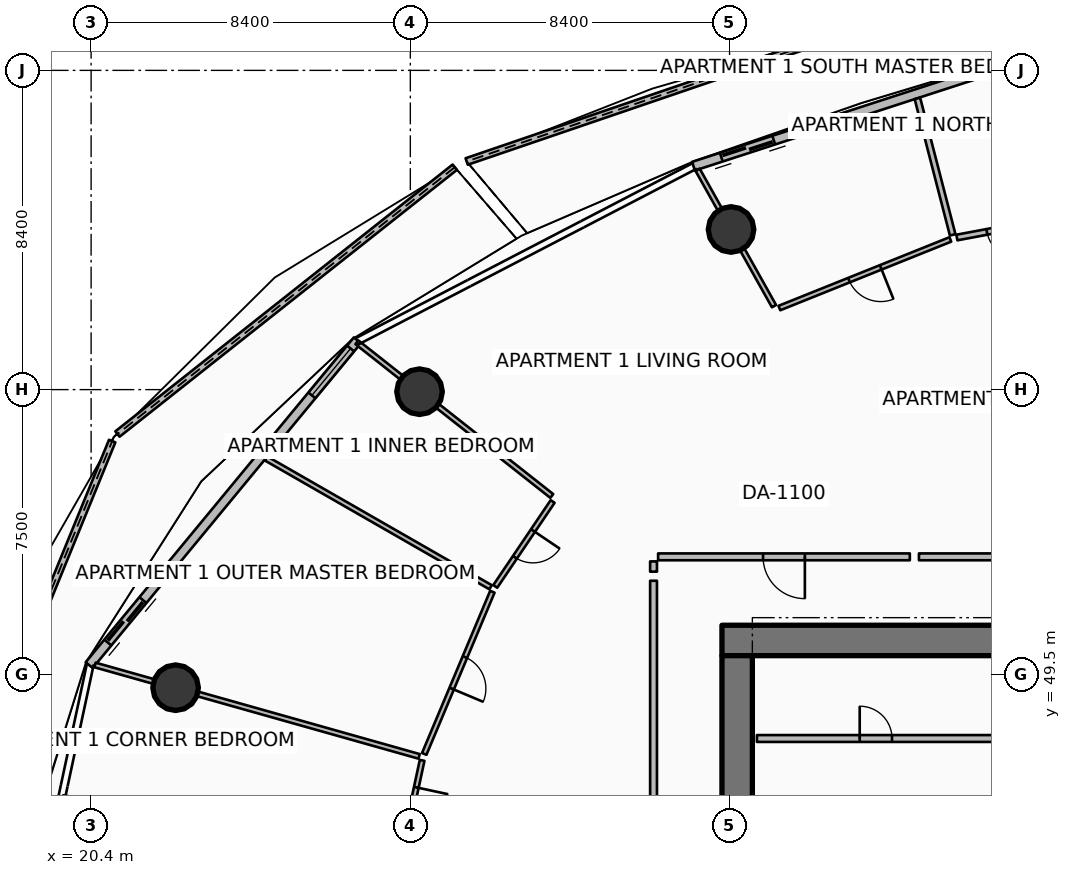
"""IFC4 building model, lengths in metres.
Left out: names, types, materials, properties, quantities, classifications, styles, units other than length and angle.
Written with IfcOpenShell. Run it as: python <this file> out.ifc"""

import sys

from ifc_helpers import new_model, si_unit, direction, frame, frame_2d, origin, origin_2d, place, context, subcontext, project, spatial, polyline, rectangle, circle, outline, extrude, element, fill, save


model = new_model("IFC4")
c1 = context("Model", 3, precision=1e-05, world=origin(), true_north=direction((0.0, 1.0)))
c2 = subcontext(c1, "Body", "Model", "MODEL_VIEW")
j1 = project(units=[si_unit("LENGTHUNIT", "METRE"), si_unit("PLANEANGLEUNIT", "RADIAN")], contexts=[c1])
p1 = place(None, origin())
s1 = spatial("IfcSite", under=j1, at=p1, CompositionType="ELEMENT")
p2 = place(p1, origin())
s2 = spatial("IfcBuilding", under=s1, at=p2, CompositionType="ELEMENT")
p3 = place(p2, frame((0.0, 0.0, 108.9)))
s3 = spatial("IfcBuildingStorey", under=s2, at=p3, CompositionType="ELEMENT", Elevation=108.9)
p4 = place(p3, frame((37.0, 50.4, 0.0), z_axis=(0.0, 0.0, 1.0), x_axis=(1.0, 0.0, 0.0)))
e1 = element("IfcWall", 1, at=p4, inside=s3, PredefinedType="SHEAR", context=c2, shape_type="SweptSolid", body=[
    extrude(rectangle(XDim=9.9, YDim=0.8, at=frame_2d((4.95, 0.0))), origin(), (0.0, 0.0, 1.0), 3.75),
])
p5 = place(p3, frame((37.4, 34.0, 0.0), z_axis=(0.0, 0.0, 1.0), x_axis=(0.0, 1.0, 0.0)))
e2 = element("IfcWall", 2, at=p5, inside=s3, PredefinedType="SHEAR", context=c2, shape_type="SweptSolid", body=[
    extrude(rectangle(XDim=16.0, YDim=0.8, at=frame_2d((8.0, 0.0))), origin(), (0.0, 0.0, 1.0), 3.75),
])
for number, where, z_axis, x_axis in (
    (3, (37.24, 61.214, 0.0), (0.0, 0.0, 1.0), (1.0, 0.0, 0.0)),
    (4, (29.042, 56.945, 0.0), (0.0, 0.0, 1.0), (1.0, 0.0, 0.0)),
    (5, (22.623, 49.157, 0.0), (0.0, 0.0, 1.0), (1.0, 0.0, 0.0)),
):
    element("IfcColumn", number, at=place(p3, frame(where, z_axis=z_axis, x_axis=x_axis)), inside=s3, PredefinedType="COLUMN", context=c2, shape_type="SweptSolid", body=[
        extrude(circle(Radius=0.6, at=origin_2d()), origin(), (0.0, 0.0, 1.0), 3.5),
    ])
p6 = place(p3, frame((39.975, 66.311, 0.0), z_axis=(0.0, 0.0, 1.0), x_axis=(-0.94637474678, -0.323070949881, 0.0)))
e6 = element("IfcWall", 6, at=p6, inside=s3, PredefinedType="PARAPET", context=c2, shape_type="SweptSolid", body=[
    extrude(outline(polyline([(0.0, 0.0), (10.241, 0.0), (10.241, 1.747), (5.121, 1.562), (0.0, 1.348), (0.0, 0.0)])), frame((0.0, 0.09, 0.0), z_axis=(0.0, -1.0, 0.0), x_axis=(1.0, 0.0, 0.0)), (0.0, 0.0, 1.0), 0.18),
])
p7 = place(p3, frame((29.969, 62.852, 0.0), z_axis=(0.0, 0.0, 1.0), x_axis=(-0.784321358075, -0.620354743084, 0.0)))
e7 = element("IfcWall", 7, at=p7, inside=s3, PredefinedType="PARAPET", context=c2, shape_type="SweptSolid", body=[
    extrude(outline(polyline([(0.0, 0.0), (11.316, 0.0), (11.316, 1.832), (5.658, 1.853), (0.0, 1.756), (0.0, 0.0)])), frame((0.0, 0.09, 0.0), z_axis=(0.0, -1.0, 0.0), x_axis=(1.0, 0.0, 0.0)), (0.0, 0.0, 1.0), 0.18),
])
p8 = place(p3, frame((20.954, 55.646, 0.0), z_axis=(0.0, 0.0, 1.0), x_axis=(-0.378274271274, -0.925693564681, 0.0)))
e8 = element("IfcWall", 8, at=p8, inside=s3, PredefinedType="PARAPET", context=c2, shape_type="SweptSolid", body=[
    extrude(outline(polyline([(0.0, 0.0), (11.852, 0.0), (11.852, 1.497), (5.926, 1.696), (0.0, 1.832), (0.0, 0.0)])), frame((0.0, 0.09, 0.0), z_axis=(0.0, -1.0, 0.0), x_axis=(1.0, 0.0, 0.0)), (0.0, 0.0, 1.0), 0.18),
])
p9 = place(p3, frame((45.233, 65.797, 0.0), z_axis=(0.0, 0.0, 1.0), x_axis=(-0.951052494852, -0.30902937083, 0.0)))
e9 = element("IfcWall", 9, at=p9, inside=s3, PredefinedType="SOLIDWALL", context=c2, shape_type="SweptSolid", body=[
    extrude(rectangle(XDim=9.444, YDim=0.24, at=frame_2d((4.722, 0.0))), origin(), (0.0, 0.0, 1.0), 2.45),
])
p10 = place(p9, frame((7.224, 0.0, 0.0)))
e10 = element("IfcOpeningElement", 10, at=p10, cuts=e9, PredefinedType="OPENING", context=c2, shape_type="SweptSolid", body=[
    extrude(rectangle(XDim=1.45, YDim=2.15, at=frame_2d((0.725, 1.075))), frame((0.0, 0.13, 0.0), z_axis=(0.0, -1.0, 0.0), x_axis=(1.0, 0.0, 0.0)), (0.0, 0.0, 1.0), 0.26),
])
p11 = place(p9, frame((0.28, 0.0, 0.65)))
e11 = element("IfcOpeningElement", 11, at=p11, cuts=e9, PredefinedType="OPENING", context=c2, shape_type="SweptSolid", body=[
    extrude(rectangle(XDim=1.6, YDim=1.5, at=frame_2d((0.8, 0.75))), frame((0.0, 0.13, 0.0), z_axis=(0.0, -1.0, 0.0), x_axis=(1.0, 0.0, 0.0)), (0.0, 0.0, 1.0), 0.26),
])
p12 = place(p3, frame((27.407, 58.298, 0.0), z_axis=(0.0, 0.0, 1.0), x_axis=(-0.636704975, -0.771107498868, 0.0)))
e12 = element("IfcWall", 12, at=p12, inside=s3, PredefinedType="SOLIDWALL", context=c2, shape_type="SweptSolid", body=[
    extrude(rectangle(XDim=11.084, YDim=0.24, at=frame_2d((5.542, 0.0))), origin(), (0.0, 0.0, 1.0), 2.45),
])
p13 = place(p12, frame((8.864, 0.0, 0.0)))
e13 = element("IfcOpeningElement", 13, at=p13, cuts=e12, PredefinedType="OPENING", context=c2, shape_type="SweptSolid", body=[
    extrude(rectangle(XDim=1.45, YDim=2.15, at=frame_2d((0.725, 1.075))), frame((0.0, 0.13, 0.0), z_axis=(0.0, -1.0, 0.0), x_axis=(1.0, 0.0, 0.0)), (0.0, 0.0, 1.0), 0.26),
])
p14 = place(p12, frame((0.28, 0.0, 0.65)))
e14 = element("IfcOpeningElement", 14, at=p14, cuts=e12, PredefinedType="OPENING", context=c2, shape_type="SweptSolid", body=[
    extrude(rectangle(XDim=1.6, YDim=1.5, at=frame_2d((0.8, 0.75))), frame((0.0, 0.13, 0.0), z_axis=(0.0, -1.0, 0.0), x_axis=(1.0, 0.0, 0.0)), (0.0, 0.0, 1.0), 0.26),
])
p15 = place(p3, frame((37.92, 47.82, 0.0), z_axis=(0.0, 0.0, 1.0), x_axis=(1.0, 0.0, 0.0)))
e15 = element("IfcWall", 15, at=p15, inside=s3, PredefinedType="PARTITIONING", context=c2, shape_type="SweptSolid", body=[
    extrude(rectangle(XDim=6.26, YDim=0.18, at=frame_2d((3.13, 0.0))), origin(), (0.0, 0.0, 1.0), 3.5),
])
p16 = place(p15, frame((2.705, 0.0, 0.0)))
e16 = element("IfcOpeningElement", 16, at=p16, cuts=e15, PredefinedType="OPENING", context=c2, shape_type="SweptSolid", body=[
    extrude(rectangle(XDim=0.85, YDim=2.06, at=frame_2d((0.425, 1.03))), frame((0.0, 0.1, 0.0), z_axis=(0.0, -1.0, 0.0), x_axis=(1.0, 0.0, 0.0)), (0.0, 0.0, 1.0), 0.2),
])
p17 = place(p3, frame((41.944, 52.6, 0.0), z_axis=(0.0, 0.0, 1.0), x_axis=(-1.0, 0.0, 0.0)))
e17 = element("IfcWall", 17, at=p17, inside=s3, PredefinedType="PARTITIONING", context=c2, shape_type="SweptSolid", body=[
    extrude(rectangle(XDim=6.624, YDim=0.18, at=frame_2d((3.312, 0.0))), origin(), (0.0, 0.0, 1.0), 2.94),
])
p18 = place(p17, frame((2.762, 0.0, 0.0)))
e18 = element("IfcOpeningElement", 18, at=p18, cuts=e17, PredefinedType="OPENING", context=c2, shape_type="SweptSolid", body=[
    extrude(rectangle(XDim=1.1, YDim=2.1, at=frame_2d((0.55, 1.05))), frame((0.0, 0.1, 0.0), z_axis=(0.0, -1.0, 0.0), x_axis=(1.0, 0.0, 0.0)), (0.0, 0.0, 1.0), 0.2),
])
p19 = place(p3, frame((35.2, 52.48, 0.0), z_axis=(0.0, 0.0, 1.0), x_axis=(0.0, -1.0, 0.0)))
e19 = element("IfcWall", 19, at=p19, inside=s3, PredefinedType="PARTITIONING", context=c2, shape_type="SweptSolid", body=[
    extrude(rectangle(XDim=0.269, YDim=0.18, at=frame_2d((0.135, 0.0))), origin(), (0.0, 0.0, 1.0), 2.94),
])
p20 = place(p3, frame((46.625, 52.6, 0.0), z_axis=(0.0, 0.0, 1.0), x_axis=(-1.0, 0.0, 0.0)))
e20 = element("IfcWall", 20, at=p20, inside=s3, PredefinedType="PARTITIONING", context=c2, shape_type="SweptSolid", body=[
    extrude(rectangle(XDim=4.442, YDim=0.18, at=frame_2d((2.221, 0.0))), origin(), (0.0, 0.0, 1.0), 2.94),
])
p21 = place(p3, frame((38.37, 59.196, 0.0), z_axis=(0.0, 0.0, 1.0), x_axis=(-0.488603368932, 0.87250601595, 0.0)))
e21 = element("IfcWall", 21, at=p21, inside=s3, PredefinedType="PARTITIONING", context=c2, shape_type="SweptSolid", body=[
    extrude(rectangle(XDim=4.113, YDim=0.125, at=frame_2d((2.057, 0.0))), origin(), (0.0, 0.0, 1.0), 2.94),
])
p22 = place(p3, frame((45.597, 61.455, 0.0), z_axis=(0.0, 0.0, 1.0), x_axis=(-0.982882310082, -0.18423453674, 0.0)))
e22 = element("IfcWall", 22, at=p22, inside=s3, PredefinedType="PARTITIONING", context=c2, shape_type="SweptSolid", body=[
    extrude(rectangle(XDim=2.457, YDim=0.15, at=frame_2d((1.229, 0.0))), origin(), (0.0, 0.0, 1.0), 2.94),
])
p23 = place(p22, frame((0.803, 0.0, 0.0)))
e23 = element("IfcOpeningElement", 23, at=p23, cuts=e22, PredefinedType="OPENING", context=c2, shape_type="SweptSolid", body=[
    extrude(rectangle(XDim=0.85, YDim=2.06, at=frame_2d((0.425, 1.03))), frame((0.0, 0.085, 0.0), z_axis=(0.0, -1.0, 0.0), x_axis=(1.0, 0.0, 0.0)), (0.0, 0.0, 1.0), 0.17),
])
p24 = place(p3, frame((43.071, 61.073, 0.0), z_axis=(0.0, 0.0, 1.0), x_axis=(-0.250228515302, 0.968186805389, 0.0)))
e24 = element("IfcWall", 24, at=p24, inside=s3, PredefinedType="PARTITIONING", context=c2, shape_type="SweptSolid", body=[
    extrude(rectangle(XDim=3.708, YDim=0.15, at=frame_2d((1.854, 0.0))), origin(), (0.0, 0.0, 1.0), 2.94),
])
p25 = place(p3, frame((43.01, 60.952, 0.0), z_axis=(0.0, 0.0, 1.0), x_axis=(-0.9280140097, -0.372545296307, 0.0)))
e25 = element("IfcWall", 25, at=p25, inside=s3, PredefinedType="PARTITIONING", context=c2, shape_type="SweptSolid", body=[
    extrude(rectangle(XDim=4.847, YDim=0.125, at=frame_2d((2.424, 0.0))), origin(), (0.0, 0.0, 1.0), 2.94),
])
p26 = place(p25, frame((1.974, 0.0, 0.0)))
e26 = element("IfcOpeningElement", 26, at=p26, cuts=e25, PredefinedType="OPENING", context=c2, shape_type="SweptSolid", body=[
    extrude(rectangle(XDim=0.9, YDim=2.08, at=frame_2d((0.45, 1.04))), frame((0.0, 0.073, 0.0), z_axis=(0.0, -1.0, 0.0), x_axis=(1.0, 0.0, 0.0)), (0.0, 0.0, 1.0), 0.145),
])
p27 = place(p3, frame((35.2, 51.971, 0.0), z_axis=(0.0, 0.0, 1.0), x_axis=(0.0, -1.0, 0.0)))
e27 = element("IfcWall", 27, at=p27, inside=s3, PredefinedType="PARTITIONING", context=c2, shape_type="SweptSolid", body=[
    extrude(rectangle(XDim=6.241, YDim=0.18, at=frame_2d((3.12, 0.0))), origin(), (0.0, 0.0, 1.0), 2.94),
])
p28 = place(p3, frame((32.522, 54.202, 0.0), z_axis=(0.0, 0.0, 1.0), x_axis=(-0.785296086335, 0.619120389574, 0.0)))
e28 = element("IfcWall", 28, at=p28, inside=s3, PredefinedType="PARTITIONING", context=c2, shape_type="SweptSolid", body=[
    extrude(rectangle(XDim=6.529, YDim=0.125, at=frame_2d((3.265, 0.0))), origin(), (0.0, 0.0, 1.0), 2.94),
])
p29 = place(p3, frame((30.912, 51.8, 0.0), z_axis=(0.0, 0.0, 1.0), x_axis=(-0.867452705788, 0.497519651091, 0.0)))
e29 = element("IfcWall", 29, at=p29, inside=s3, PredefinedType="PARTITIONING", context=c2, shape_type="SweptSolid", body=[
    extrude(rectangle(XDim=6.814, YDim=0.125, at=frame_2d((3.407, 0.0))), origin(), (0.0, 0.0, 1.0), 2.94),
])
p30 = place(p3, frame((32.545, 54.057, 0.0), z_axis=(0.0, 0.0, 1.0), x_axis=(-0.559849013212, -0.828594642998, 0.0)))
e30 = element("IfcWall", 30, at=p30, inside=s3, PredefinedType="PARTITIONING", context=c2, shape_type="SweptSolid", body=[
    extrude(rectangle(XDim=2.697, YDim=0.125, at=frame_2d((1.349, 0.0))), origin(), (0.0, 0.0, 1.0), 2.94),
])
p31 = place(p30, frame((0.924, 0.0, 0.0)))
e31 = element("IfcOpeningElement", 31, at=p31, cuts=e30, PredefinedType="OPENING", context=c2, shape_type="SweptSolid", body=[
    extrude(rectangle(XDim=0.85, YDim=2.06, at=frame_2d((0.425, 1.03))), frame((0.0, 0.073, 0.0), z_axis=(0.0, -1.0, 0.0), x_axis=(1.0, 0.0, 0.0)), (0.0, 0.0, 1.0), 0.145),
])
p32 = place(p3, frame((30.959, 51.682, 0.0), z_axis=(0.0, 0.0, 1.0), x_axis=(-0.387377754923, -0.921921078505, 0.0)))
e32 = element("IfcWall", 32, at=p32, inside=s3, PredefinedType="PARTITIONING", context=c2, shape_type="SweptSolid", body=[
    extrude(rectangle(XDim=4.628, YDim=0.125, at=frame_2d((2.314, 0.0))), origin(), (0.0, 0.0, 1.0), 2.94),
])
p33 = place(p32, frame((1.864, 0.0, 0.0)))
e33 = element("IfcOpeningElement", 33, at=p33, cuts=e32, PredefinedType="OPENING", context=c2, shape_type="SweptSolid", body=[
    extrude(rectangle(XDim=0.9, YDim=2.08, at=frame_2d((0.45, 1.04))), frame((0.0, 0.073, 0.0), z_axis=(0.0, -1.0, 0.0), x_axis=(1.0, 0.0, 0.0)), (0.0, 0.0, 1.0), 0.145),
])
p34 = place(p3, frame((29.031, 47.35, 0.0), z_axis=(0.0, 0.0, 1.0), x_axis=(-0.962455027906, 0.271441189317, 0.0)))
e34 = element("IfcWall", 34, at=p34, inside=s3, PredefinedType="PARTITIONING", context=c2, shape_type="SweptSolid", body=[
    extrude(rectangle(XDim=8.862, YDim=0.125, at=frame_2d((4.431, 0.0))), origin(), (0.0, 0.0, 1.0), 2.94),
])
p35 = place(p3, frame((28.52, 44.929, 0.0), z_axis=(0.0, 0.0, 1.0), x_axis=(-0.988886383278, 0.148673201912, 0.0)))
e35 = element("IfcWall", 35, at=p35, inside=s3, PredefinedType="PARTITIONING", context=c2, shape_type="SweptSolid", body=[
    extrude(rectangle(XDim=8.969, YDim=0.125, at=frame_2d((4.485, 0.0))), origin(), (0.0, 0.0, 1.0), 2.94),
])
p36 = place(p3, frame((29.11, 47.244, 0.0), z_axis=(0.0, 0.0, 1.0), x_axis=(-0.210470334655, -0.977600244594, 0.0)))
e36 = element("IfcWall", 36, at=p36, inside=s3, PredefinedType="PARTITIONING", context=c2, shape_type="SweptSolid", body=[
    extrude(rectangle(XDim=2.302, YDim=0.125, at=frame_2d((1.151, 0.0))), origin(), (0.0, 0.0, 1.0), 2.94),
])
p37 = place(p36, frame((0.726, 0.0, 0.0)))
e37 = element("IfcOpeningElement", 37, at=p37, cuts=e36, PredefinedType="OPENING", context=c2, shape_type="SweptSolid", body=[
    extrude(rectangle(XDim=0.85, YDim=2.06, at=frame_2d((0.425, 1.03))), frame((0.0, 0.073, 0.0), z_axis=(0.0, -1.0, 0.0), x_axis=(1.0, 0.0, 0.0)), (0.0, 0.0, 1.0), 0.145),
])
p38 = place(p10, origin())
e38 = element("IfcDoor", 38, at=p38, inside=s3, OperationType="DOUBLE_DOOR_SLIDING", PredefinedType="DOOR", context=c2, shape_type="SweptSolid", body=[
    extrude(rectangle(XDim=1.45, YDim=2.15, at=frame_2d((0.725, 1.075))), frame((0.0, 0.025, 0.0), z_axis=(0.0, -1.0, 0.0), x_axis=(1.0, 0.0, 0.0)), (0.0, 0.0, 1.0), 0.05),
])
fill(e10, e38)
p39 = place(p11, origin())
e39 = element("IfcWindow", 39, at=p39, inside=s3, PartitioningType="SINGLE_PANEL", PredefinedType="WINDOW", context=c2, shape_type="SweptSolid", body=[
    extrude(rectangle(XDim=1.6, YDim=1.5, at=frame_2d((0.8, 0.75))), frame((0.0, 0.03, 0.0), z_axis=(0.0, -1.0, 0.0), x_axis=(1.0, 0.0, 0.0)), (0.0, 0.0, 1.0), 0.06),
])
fill(e11, e39)
p40 = place(p13, origin())
e40 = element("IfcDoor", 40, at=p40, inside=s3, OperationType="DOUBLE_DOOR_SLIDING", PredefinedType="DOOR", context=c2, shape_type="SweptSolid", body=[
    extrude(rectangle(XDim=1.45, YDim=2.15, at=frame_2d((0.725, 1.075))), frame((0.0, 0.025, 0.0), z_axis=(0.0, -1.0, 0.0), x_axis=(1.0, 0.0, 0.0)), (0.0, 0.0, 1.0), 0.05),
])
fill(e13, e40)
p41 = place(p14, origin())
e41 = element("IfcWindow", 41, at=p41, inside=s3, PartitioningType="SINGLE_PANEL", PredefinedType="WINDOW", context=c2, shape_type="SweptSolid", body=[
    extrude(rectangle(XDim=1.6, YDim=1.5, at=frame_2d((0.8, 0.75))), frame((0.0, 0.03, 0.0), z_axis=(0.0, -1.0, 0.0), x_axis=(1.0, 0.0, 0.0)), (0.0, 0.0, 1.0), 0.06),
])
fill(e14, e41)
p42 = place(p16, origin())
e42 = element("IfcDoor", 42, at=p42, inside=s3, OperationType="SINGLE_SWING_LEFT", PredefinedType="DOOR", context=c2, shape_type="SweptSolid", body=[
    extrude(rectangle(XDim=0.85, YDim=2.06, at=frame_2d((0.425, 1.03))), frame((0.0, 0.025, 0.0), z_axis=(0.0, -1.0, 0.0), x_axis=(1.0, 0.0, 0.0)), (0.0, 0.0, 1.0), 0.05),
])
fill(e16, e42)
p43 = place(p18, origin())
e43 = element("IfcDoor", 43, at=p43, inside=s3, OperationType="SINGLE_SWING_LEFT", PredefinedType="DOOR", context=c2, shape_type="SweptSolid", body=[
    extrude(rectangle(XDim=1.1, YDim=2.1, at=frame_2d((0.55, 1.05))), frame((0.0, 0.025, 0.0), z_axis=(0.0, -1.0, 0.0), x_axis=(1.0, 0.0, 0.0)), (0.0, 0.0, 1.0), 0.05),
])
fill(e18, e43)
p44 = place(p23, origin())
e44 = element("IfcDoor", 44, at=p44, inside=s3, OperationType="SINGLE_SWING_LEFT", PredefinedType="DOOR", context=c2, shape_type="SweptSolid", body=[
    extrude(rectangle(XDim=0.85, YDim=2.06, at=frame_2d((0.425, 1.03))), frame((0.0, 0.025, 0.0), z_axis=(0.0, -1.0, 0.0), x_axis=(1.0, 0.0, 0.0)), (0.0, 0.0, 1.0), 0.05),
])
fill(e23, e44)
p45 = place(p26, origin())
e45 = element("IfcDoor", 45, at=p45, inside=s3, OperationType="SINGLE_SWING_LEFT", PredefinedType="DOOR", context=c2, shape_type="SweptSolid", body=[
    extrude(rectangle(XDim=0.9, YDim=2.08, at=frame_2d((0.45, 1.04))), frame((0.0, 0.025, 0.0), z_axis=(0.0, -1.0, 0.0), x_axis=(1.0, 0.0, 0.0)), (0.0, 0.0, 1.0), 0.05),
])
fill(e26, e45)
p46 = place(p31, origin())
e46 = element("IfcDoor", 46, at=p46, inside=s3, OperationType="SINGLE_SWING_LEFT", PredefinedType="DOOR", context=c2, shape_type="SweptSolid", body=[
    extrude(rectangle(XDim=0.85, YDim=2.06, at=frame_2d((0.425, 1.03))), frame((0.0, 0.025, 0.0), z_axis=(0.0, -1.0, 0.0), x_axis=(1.0, 0.0, 0.0)), (0.0, 0.0, 1.0), 0.05),
])
fill(e31, e46)
p47 = place(p33, origin())
e47 = element("IfcDoor", 47, at=p47, inside=s3, OperationType="SINGLE_SWING_RIGHT", PredefinedType="DOOR", context=c2, shape_type="SweptSolid", body=[
    extrude(rectangle(XDim=0.9, YDim=2.08, at=frame_2d((0.45, 1.04))), frame((0.0, 0.025, 0.0), z_axis=(0.0, -1.0, 0.0), x_axis=(1.0, 0.0, 0.0)), (0.0, 0.0, 1.0), 0.05),
])
fill(e33, e47)
p48 = place(p37, origin())
e48 = element("IfcDoor", 48, at=p48, inside=s3, OperationType="SINGLE_SWING_LEFT", PredefinedType="DOOR", context=c2, shape_type="SweptSolid", body=[
    extrude(rectangle(XDim=0.85, YDim=2.06, at=frame_2d((0.425, 1.03))), frame((0.0, 0.025, 0.0), z_axis=(0.0, -1.0, 0.0), x_axis=(1.0, 0.0, 0.0)), (0.0, 0.0, 1.0), 0.05),
])
fill(e37, e48)
save(model, sys.argv[1])
